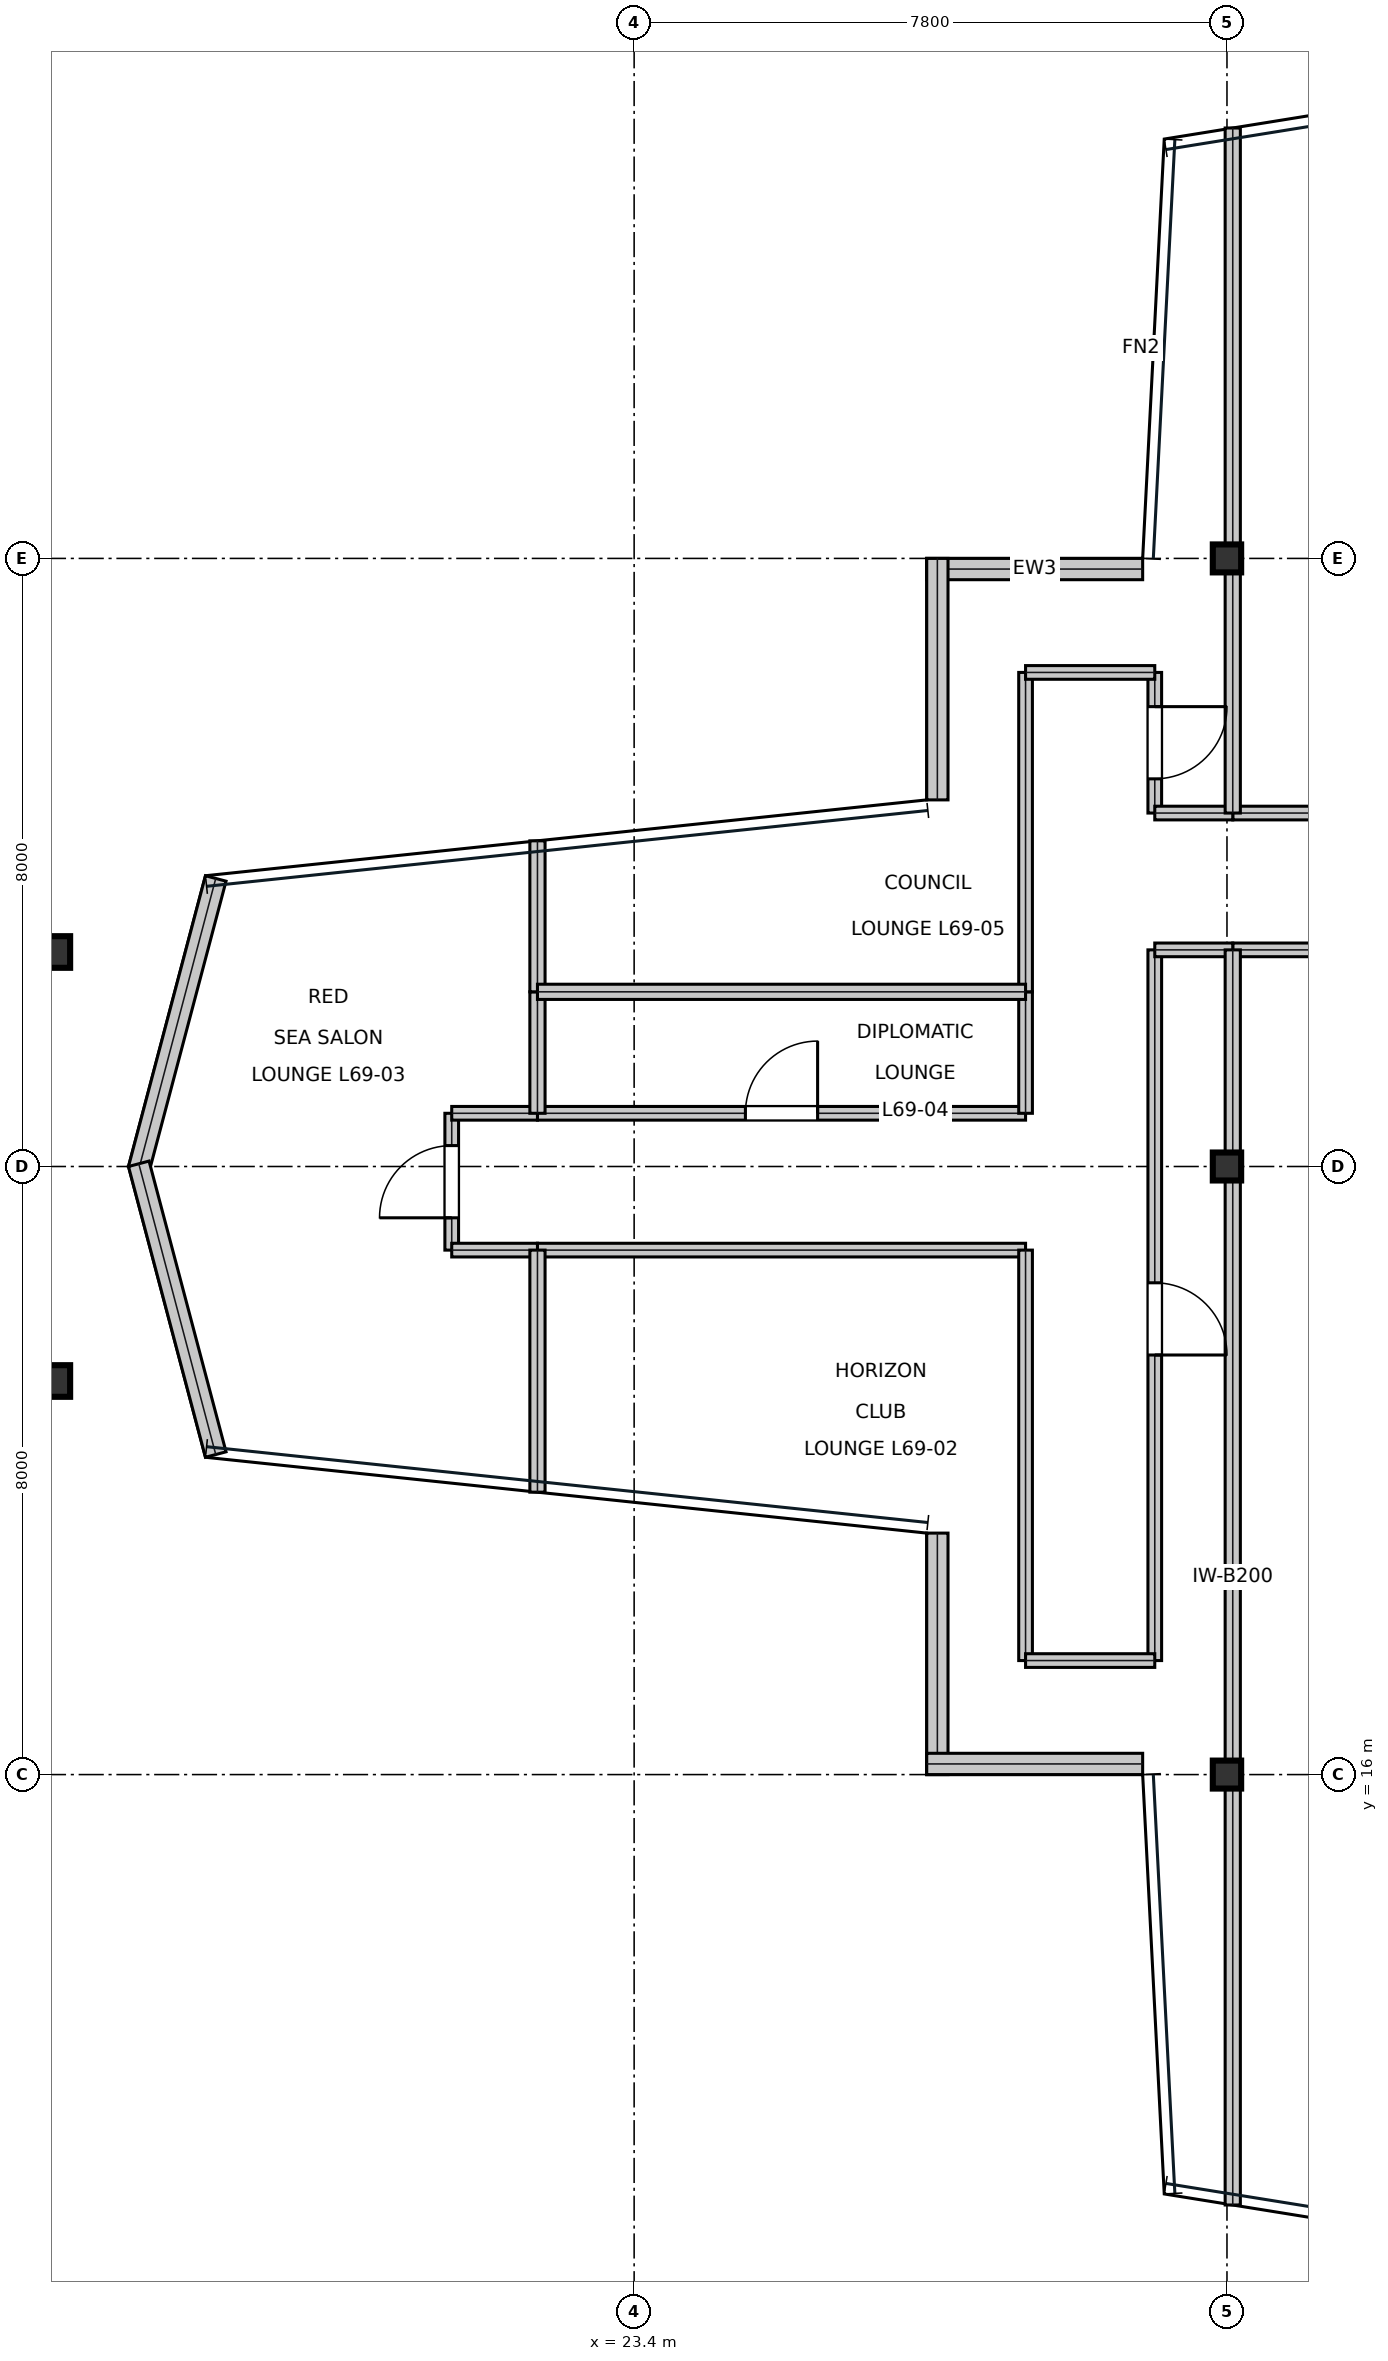
"""IFC4 building model, lengths in metres.
Left out: names, types, materials, properties, quantities, classifications, styles, units other than length and angle.
Written with IfcOpenShell. Run it as: python <this file> out.ifc"""

import sys

from ifc_helpers import new_model, si_unit, direction, frame, frame_2d, origin, origin_2d, place, context, subcontext, project, spatial, rectangle, i_section, extrude, element, fill, save


model = new_model("IFC4")
c1 = context("Model", 3, precision=1e-05, world=origin(), true_north=direction((0.0, 1.0)))
c2 = subcontext(c1, "Body", "Model", "MODEL_VIEW")
j1 = project(units=[si_unit("LENGTHUNIT", "METRE"), si_unit("PLANEANGLEUNIT", "RADIAN")], contexts=[c1])
p1 = place(None, origin())
s1 = spatial("IfcSite", under=j1, at=p1, CompositionType="ELEMENT")
p2 = place(p1, origin())
s2 = spatial("IfcBuilding", under=s1, at=p2, CompositionType="ELEMENT")
p3 = place(p2, frame((0.0, 0.0, 295.2)))
s3 = spatial("IfcBuildingStorey", under=s2, at=p3, CompositionType="ELEMENT", Elevation=295.2)
for number, where, z_axis, x_axis in (
    (1, (31.2, 16.0, 0.0), (0.0, 0.0, 1.0), (1.0, 0.0, 0.0)),
    (2, (31.2, 24.0, 0.0), (0.0, 0.0, 1.0), (1.0, 0.0, 0.0)),
    (3, (31.2, 32.0, 0.0), (0.0, 0.0, 1.0), (1.0, 0.0, 0.0)),
):
    element("IfcColumn", number, at=place(p3, frame(where, z_axis=z_axis, x_axis=x_axis)), inside=s3, PredefinedType="COLUMN", context=c2, shape_type="SweptSolid", body=[
        extrude(i_section(OverallWidth=0.373, OverallDepth=0.368, WebThickness=0.015, FlangeThickness=0.024, at=origin_2d()), origin(), (0.0, 0.0, 1.0), 4.044),
    ])
for number, where, z_axis, x_axis in (
    (4, (15.776, 21.178, 0.016), (0.0, 0.0, 1.0), (1.0, 0.0, 0.0)),
    (5, (15.776, 26.822, 0.016), (0.0, 0.0, 1.0), (1.0, 0.0, 0.0)),
):
    element("IfcColumn", number, at=place(p3, frame(where, z_axis=z_axis, x_axis=x_axis)), inside=s3, PredefinedType="COLUMN", context=c2, shape_type="SweptSolid", body=[
        extrude(i_section(OverallWidth=0.406, OverallDepth=0.416, WebThickness=0.03, FlangeThickness=0.048, at=origin_2d()), origin(), (0.0, 0.0, 1.0), 4.018),
    ])
p4 = place(p3, frame((30.091, 31.86, 0.0), z_axis=(0.0, 0.0, 1.0), x_axis=(-1.0, 0.0, 0.0)))
e6 = element("IfcWall", 6, at=p4, inside=s3, PredefinedType="STANDARD", context=c2, shape_type="SweptSolid", body=[
    extrude(rectangle(XDim=2.841, YDim=0.28, at=frame_2d((1.421, 0.0))), origin(), (0.0, 0.0, 1.0), 3.81),
])
p5 = place(p3, frame((27.39, 32.0, 0.0), z_axis=(0.0, 0.0, 1.0), x_axis=(0.0, -1.0, 0.0)))
e7 = element("IfcWall", 7, at=p5, inside=s3, PredefinedType="STANDARD", context=c2, shape_type="SweptSolid", body=[
    extrude(rectangle(XDim=3.177, YDim=0.28, at=frame_2d((1.588, 0.0))), origin(), (0.0, 0.0, 1.0), 3.339),
])
for number, where, z_axis, x_axis in (
    (8, (17.895, 27.79, 0.0), (0.0, 0.0, 1.0), (-0.256, -0.967, 0.0)),
    (9, (16.883, 24.036, 0.0), (0.0, 0.0, 1.0), (0.256, -0.967, 0.0)),
):
    element("IfcWall", number, at=place(p3, frame(where, z_axis=z_axis, x_axis=x_axis)), inside=s3, PredefinedType="STANDARD", context=c2, shape_type="SweptSolid", body=[
        extrude(rectangle(XDim=3.957, YDim=0.28, at=frame_2d((1.979, 0.0))), origin(), (0.0, 0.0, 1.0), 3.27),
    ])
p6 = place(p3, frame((27.39, 19.177, 0.0), z_axis=(0.0, 0.0, 1.0), x_axis=(0.0, -1.0, 0.0)))
e10 = element("IfcWall", 10, at=p6, inside=s3, PredefinedType="STANDARD", context=c2, shape_type="SweptSolid", body=[
    extrude(rectangle(XDim=3.177, YDim=0.28, at=frame_2d((1.588, 0.0))), origin(), (0.0, 0.0, 1.0), 3.339),
])
p7 = place(p3, frame((27.25, 16.14, 0.0), z_axis=(0.0, 0.0, 1.0), x_axis=(1.0, 0.0, 0.0)))
e11 = element("IfcWall", 11, at=p7, inside=s3, PredefinedType="STANDARD", context=c2, shape_type="SweptSolid", body=[
    extrude(rectangle(XDim=2.841, YDim=0.28, at=frame_2d((1.421, 0.0))), origin(), (0.0, 0.0, 1.0), 3.81),
])
p8 = place(p3, frame((30.25, 17.5, 0.0), z_axis=(0.0, 0.0, 1.0), x_axis=(0.0, 1.0, 0.0)))
e12 = element("IfcWall", 12, at=p8, inside=s3, PredefinedType="SOLIDWALL", context=c2, shape_type="SweptSolid", body=[
    extrude(rectangle(XDim=9.35, YDim=0.18, at=frame_2d((4.675, 0.0))), origin(), (0.0, 0.0, 1.0), 3.27),
])
p9 = place(p8, frame((4.02, 0.0, 0.0)))
e13 = element("IfcOpeningElement", 13, at=p9, cuts=e12, PredefinedType="OPENING", context=c2, shape_type="SweptSolid", body=[
    extrude(rectangle(XDim=0.95, YDim=2.15, at=frame_2d((0.475, 1.075))), frame((0.0, 0.1, 0.0), z_axis=(0.0, -1.0, 0.0), x_axis=(1.0, 0.0, 0.0)), (0.0, 0.0, 1.0), 0.2),
])
p10 = place(p3, frame((21.0, 22.9, 0.0), z_axis=(0.0, 0.0, 1.0), x_axis=(0.0, 1.0, 0.0)))
e14 = element("IfcWall", 14, at=p10, inside=s3, PredefinedType="SOLIDWALL", context=c2, shape_type="SweptSolid", body=[
    extrude(rectangle(XDim=1.8, YDim=0.18, at=frame_2d((0.9, 0.0))), origin(), (0.0, 0.0, 1.0), 3.81),
])
p11 = place(p10, frame((0.425, 0.0, 0.0)))
e15 = element("IfcOpeningElement", 15, at=p11, cuts=e14, PredefinedType="OPENING", context=c2, shape_type="SweptSolid", body=[
    extrude(rectangle(XDim=0.95, YDim=2.15, at=frame_2d((0.475, 1.075))), frame((0.0, 0.1, 0.0), z_axis=(0.0, -1.0, 0.0), x_axis=(1.0, 0.0, 0.0)), (0.0, 0.0, 1.0), 0.2),
])
p12 = place(p3, frame((22.128, 24.7, 0.0), z_axis=(0.0, 0.0, 1.0), x_axis=(1.0, 0.0, 0.0)))
e16 = element("IfcWall", 16, at=p12, inside=s3, PredefinedType="SOLIDWALL", context=c2, shape_type="SweptSolid", body=[
    extrude(rectangle(XDim=6.422, YDim=0.18, at=frame_2d((3.211, 0.0))), origin(), (0.0, 0.0, 1.0), 3.27),
])
p13 = place(p12, frame((2.736, 0.0, 0.0)))
e17 = element("IfcOpeningElement", 17, at=p13, cuts=e16, PredefinedType="OPENING", context=c2, shape_type="SweptSolid", body=[
    extrude(rectangle(XDim=0.95, YDim=2.15, at=frame_2d((0.475, 1.075))), frame((0.0, 0.1, 0.0), z_axis=(0.0, -1.0, 0.0), x_axis=(1.0, 0.0, 0.0)), (0.0, 0.0, 1.0), 0.2),
])
p14 = place(p3, frame((30.25, 28.65, 0.0), z_axis=(0.0, 0.0, 1.0), x_axis=(0.0, 1.0, 0.0)))
e18 = element("IfcWall", 18, at=p14, inside=s3, PredefinedType="SOLIDWALL", context=c2, shape_type="SweptSolid", body=[
    extrude(rectangle(XDim=1.85, YDim=0.18, at=frame_2d((0.925, 0.0))), origin(), (0.0, 0.0, 1.0), 3.81),
])
p15 = place(p14, frame((0.45, 0.0, 0.0)))
e19 = element("IfcOpeningElement", 19, at=p15, cuts=e18, PredefinedType="OPENING", context=c2, shape_type="SweptSolid", body=[
    extrude(rectangle(XDim=0.95, YDim=2.15, at=frame_2d((0.475, 1.075))), frame((0.0, 0.1, 0.0), z_axis=(0.0, -1.0, 0.0), x_axis=(1.0, 0.0, 0.0)), (0.0, 0.0, 1.0), 0.2),
])
p16 = place(p3, frame((31.276, 28.65, 0.0), z_axis=(0.0, 0.0, 1.0), x_axis=(1.0, 0.0, 0.0)))
e20 = element("IfcWall", 20, at=p16, inside=s3, PredefinedType="SOLIDWALL", context=c2, shape_type="SweptSolid", body=[
    extrude(rectangle(XDim=5.774, YDim=0.18, at=frame_2d((2.887, 0.0))), origin(), (0.0, 0.0, 1.0), 3.81),
])
p17 = place(p16, frame((2.412, 0.0, 0.0)))
e21 = element("IfcOpeningElement", 21, at=p17, cuts=e20, PredefinedType="OPENING", context=c2, shape_type="SweptSolid", body=[
    extrude(rectangle(XDim=0.95, YDim=2.15, at=frame_2d((0.475, 1.075))), frame((0.0, 0.1, 0.0), z_axis=(0.0, -1.0, 0.0), x_axis=(1.0, 0.0, 0.0)), (0.0, 0.0, 1.0), 0.2),
])
p18 = place(p3, frame((31.276, 26.85, 0.0), z_axis=(0.0, 0.0, 1.0), x_axis=(1.0, 0.0, 0.0)))
e22 = element("IfcWall", 22, at=p18, inside=s3, PredefinedType="SOLIDWALL", context=c2, shape_type="SweptSolid", body=[
    extrude(rectangle(XDim=4.874, YDim=0.18, at=frame_2d((2.437, 0.0))), origin(), (0.0, 0.0, 1.0), 3.81),
])
p19 = place(p3, frame((22.128, 22.9, 0.0), z_axis=(0.0, 0.0, 1.0), x_axis=(1.0, 0.0, 0.0)))
e23 = element("IfcWall", 23, at=p19, inside=s3, PredefinedType="SOLIDWALL", context=c2, shape_type="SweptSolid", body=[
    extrude(rectangle(XDim=6.422, YDim=0.18, at=frame_2d((3.211, 0.0))), origin(), (0.0, 0.0, 1.0), 3.27),
])
p20 = place(p3, frame((28.55, 17.5, 0.0), z_axis=(0.0, 0.0, 1.0), x_axis=(0.0, 1.0, 0.0)))
e24 = element("IfcWall", 24, at=p20, inside=s3, PredefinedType="SOLIDWALL", context=c2, shape_type="SweptSolid", body=[
    extrude(rectangle(XDim=5.4, YDim=0.18, at=frame_2d((2.7, 0.0))), origin(), (0.0, 0.0, 1.0), 3.81),
])
p21 = place(p3, frame((28.55, 17.5, 0.0), z_axis=(0.0, 0.0, 1.0), x_axis=(1.0, 0.0, 0.0)))
e25 = element("IfcWall", 25, at=p21, inside=s3, PredefinedType="SOLIDWALL", context=c2, shape_type="SweptSolid", body=[
    extrude(rectangle(XDim=1.7, YDim=0.18, at=frame_2d((0.85, 0.0))), origin(), (0.0, 0.0, 1.0), 3.81),
])
p22 = place(p3, frame((30.25, 26.85, 0.0), z_axis=(0.0, 0.0, 1.0), x_axis=(1.0, 0.0, 0.0)))
e26 = element("IfcWall", 26, at=p22, inside=s3, PredefinedType="SOLIDWALL", context=c2, shape_type="SweptSolid", body=[
    extrude(rectangle(XDim=1.026, YDim=0.18, at=frame_2d((0.513, 0.0))), origin(), (0.0, 0.0, 1.0), 3.27),
])
for number, where, z_axis, x_axis in (
    (27, (21.0, 22.9, 0.0), (0.0, 0.0, 1.0), (1.0, 0.0, 0.0)),
    (28, (21.0, 24.7, 0.0), (0.0, 0.0, 1.0), (1.0, 0.0, 0.0)),
):
    element("IfcWall", number, at=place(p3, frame(where, z_axis=z_axis, x_axis=x_axis)), inside=s3, PredefinedType="SOLIDWALL", context=c2, shape_type="SweptSolid", body=[
        extrude(rectangle(XDim=1.128, YDim=0.18, at=frame_2d((0.564, 0.0))), origin(), (0.0, 0.0, 1.0), 3.54),
    ])
p23 = place(p3, frame((28.55, 24.7, 0.0), z_axis=(0.0, 0.0, 1.0), x_axis=(0.0, 1.0, 0.0)))
e29 = element("IfcWall", 29, at=p23, inside=s3, PredefinedType="SOLIDWALL", context=c2, shape_type="SweptSolid", body=[
    extrude(rectangle(XDim=1.598, YDim=0.18, at=frame_2d((0.799, 0.0))), origin(), (0.0, 0.0, 1.0), 3.81),
])
p24 = place(p3, frame((28.55, 26.298, 0.0), z_axis=(0.0, 0.0, 1.0), x_axis=(0.0, 1.0, 0.0)))
e30 = element("IfcWall", 30, at=p24, inside=s3, PredefinedType="SOLIDWALL", context=c2, shape_type="SweptSolid", body=[
    extrude(rectangle(XDim=4.202, YDim=0.18, at=frame_2d((2.101, 0.0))), origin(), (0.0, 0.0, 1.0), 3.81),
])
p25 = place(p3, frame((28.55, 30.5, 0.0), z_axis=(0.0, 0.0, 1.0), x_axis=(1.0, 0.0, 0.0)))
e31 = element("IfcWall", 31, at=p25, inside=s3, PredefinedType="SOLIDWALL", context=c2, shape_type="SweptSolid", body=[
    extrude(rectangle(XDim=1.7, YDim=0.18, at=frame_2d((0.85, 0.0))), origin(), (0.0, 0.0, 1.0), 3.81),
])
p26 = place(p3, frame((30.25, 28.65, 0.0), z_axis=(0.0, 0.0, 1.0), x_axis=(1.0, 0.0, 0.0)))
e32 = element("IfcWall", 32, at=p26, inside=s3, PredefinedType="SOLIDWALL", context=c2, shape_type="SweptSolid", body=[
    extrude(rectangle(XDim=1.026, YDim=0.18, at=frame_2d((0.513, 0.0))), origin(), (0.0, 0.0, 1.0), 3.27),
])
p27 = place(p3, frame((31.276, 10.337, 0.0), z_axis=(0.0, 0.0, 1.0), x_axis=(0.0, 1.0, 0.0)))
e33 = element("IfcWall", 33, at=p27, inside=s3, PredefinedType="SOLIDWALL", context=c2, shape_type="SweptSolid", body=[
    extrude(rectangle(XDim=16.513, YDim=0.2, at=frame_2d((8.256, 0.0))), origin(), (0.0, 0.0, 1.0), 3.27),
])
p28 = place(p3, frame((22.128, 19.715, 0.0), z_axis=(0.0, 0.0, 1.0), x_axis=(0.0, 1.0, 0.0)))
e34 = element("IfcWall", 34, at=p28, inside=s3, PredefinedType="SOLIDWALL", context=c2, shape_type="SweptSolid", body=[
    extrude(rectangle(XDim=3.185, YDim=0.2, at=frame_2d((1.592, 0.0))), origin(), (0.0, 0.0, 1.0), 3.27),
])
p29 = place(p3, frame((22.128, 24.7, 0.0), z_axis=(0.0, 0.0, 1.0), x_axis=(0.0, 1.0, 0.0)))
e35 = element("IfcWall", 35, at=p29, inside=s3, PredefinedType="SOLIDWALL", context=c2, shape_type="SweptSolid", body=[
    extrude(rectangle(XDim=1.598, YDim=0.2, at=frame_2d((0.799, 0.0))), origin(), (0.0, 0.0, 1.0), 3.27),
])
p30 = place(p3, frame((22.128, 26.298, 0.0), z_axis=(0.0, 0.0, 1.0), x_axis=(0.0, 1.0, 0.0)))
e36 = element("IfcWall", 36, at=p30, inside=s3, PredefinedType="SOLIDWALL", context=c2, shape_type="SweptSolid", body=[
    extrude(rectangle(XDim=1.987, YDim=0.2, at=frame_2d((0.993, 0.0))), origin(), (0.0, 0.0, 1.0), 3.81),
])
p31 = place(p3, frame((22.128, 26.298, 0.0), z_axis=(0.0, 0.0, 1.0), x_axis=(1.0, 0.0, 0.0)))
e37 = element("IfcWall", 37, at=p31, inside=s3, PredefinedType="SOLIDWALL", context=c2, shape_type="SweptSolid", body=[
    extrude(rectangle(XDim=6.422, YDim=0.2, at=frame_2d((3.211, 0.0))), origin(), (0.0, 0.0, 1.0), 3.54),
])
p32 = place(p3, frame((31.276, 28.65, 0.0), z_axis=(0.0, 0.0, 1.0), x_axis=(0.0, 1.0, 0.0)))
e38 = element("IfcWall", 38, at=p32, inside=s3, PredefinedType="SOLIDWALL", context=c2, shape_type="SweptSolid", body=[
    extrude(rectangle(XDim=9.013, YDim=0.2, at=frame_2d((4.506, 0.0))), origin(), (0.0, 0.0, 1.0), 3.27),
])
p33 = place(p9, frame((0.95, 0.0, 0.0), z_axis=(0.0, 0.0, 1.0), x_axis=(-1.0, 0.0, 0.0)))
e39 = element("IfcDoor", 39, at=p33, inside=s3, OperationType="SINGLE_SWING_RIGHT", PredefinedType="DOOR", context=c2, shape_type="SweptSolid", body=[
    extrude(rectangle(XDim=0.95, YDim=2.15, at=frame_2d((0.475, 1.075))), frame((0.0, 0.025, 0.0), z_axis=(0.0, -1.0, 0.0), x_axis=(1.0, 0.0, 0.0)), (0.0, 0.0, 1.0), 0.05),
])
fill(e13, e39)
p34 = place(p11, origin())
e40 = element("IfcDoor", 40, at=p34, inside=s3, OperationType="SINGLE_SWING_LEFT", PredefinedType="DOOR", context=c2, shape_type="SweptSolid", body=[
    extrude(rectangle(XDim=0.95, YDim=2.15, at=frame_2d((0.475, 1.075))), frame((0.0, 0.025, 0.0), z_axis=(0.0, -1.0, 0.0), x_axis=(1.0, 0.0, 0.0)), (0.0, 0.0, 1.0), 0.05),
])
fill(e15, e40)
p35 = place(p13, origin())
e41 = element("IfcDoor", 41, at=p35, inside=s3, OperationType="SINGLE_SWING_RIGHT", PredefinedType="DOOR", context=c2, shape_type="SweptSolid", body=[
    extrude(rectangle(XDim=0.95, YDim=2.15, at=frame_2d((0.475, 1.075))), frame((0.0, 0.025, 0.0), z_axis=(0.0, -1.0, 0.0), x_axis=(1.0, 0.0, 0.0)), (0.0, 0.0, 1.0), 0.05),
])
fill(e17, e41)
p36 = place(p15, frame((0.95, 0.0, 0.0), z_axis=(0.0, 0.0, 1.0), x_axis=(-1.0, 0.0, 0.0)))
e42 = element("IfcDoor", 42, at=p36, inside=s3, OperationType="SINGLE_SWING_LEFT", PredefinedType="DOOR", context=c2, shape_type="SweptSolid", body=[
    extrude(rectangle(XDim=0.95, YDim=2.15, at=frame_2d((0.475, 1.075))), frame((0.0, 0.025, 0.0), z_axis=(0.0, -1.0, 0.0), x_axis=(1.0, 0.0, 0.0)), (0.0, 0.0, 1.0), 0.05),
])
fill(e19, e42)
save(model, sys.argv[1])
